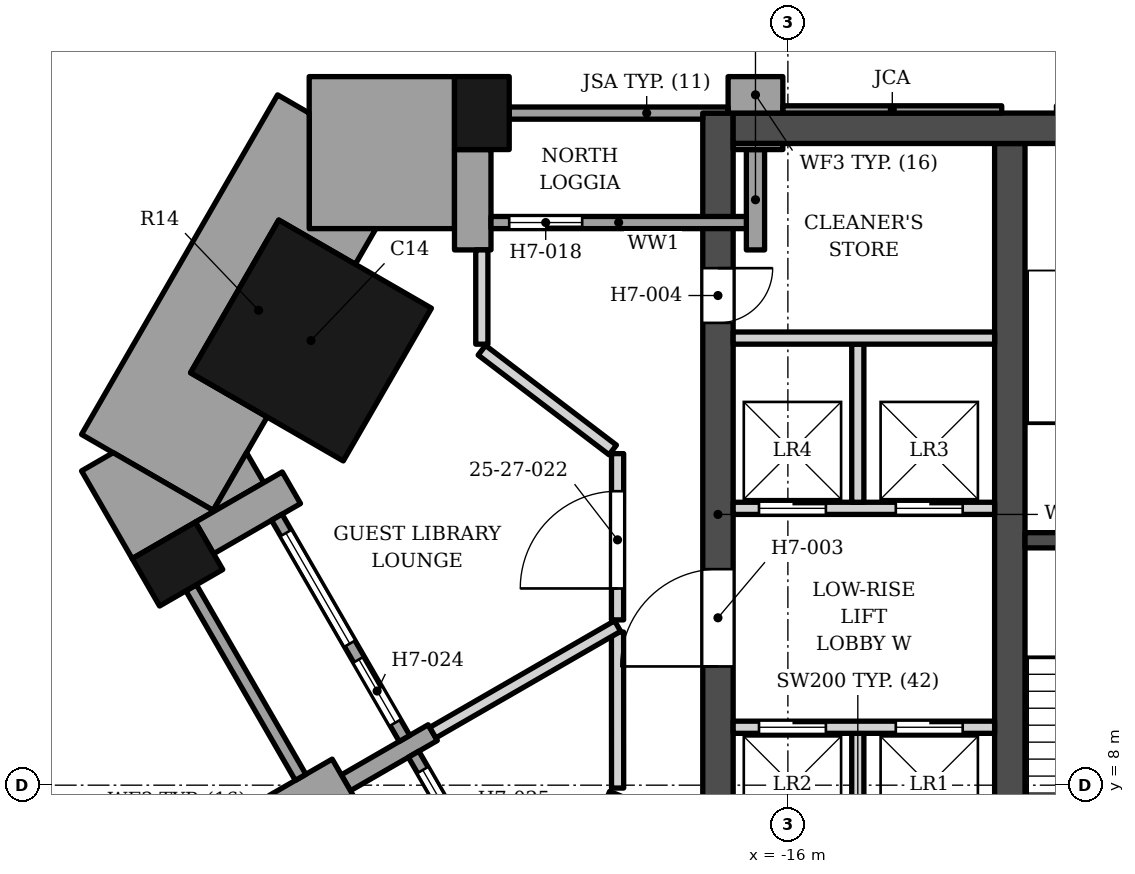
"""IFC4 building model, lengths in metres.
Left out: names, types, materials, properties, quantities, classifications, styles, units other than length and angle.
Written with IfcOpenShell. Run it as: python <this file> out.ifc"""

import sys

from ifc_helpers import new_model, si_unit, direction, frame, frame_2d, origin, origin_2d, place, context, subcontext, project, spatial, polyline, rectangle, outline, extrude, element, fill, save


model = new_model("IFC4")
c1 = context("Model", 3, precision=1e-05, world=origin(), true_north=direction((0.0, 1.0)))
c2 = subcontext(c1, "Body", "Model", "MODEL_VIEW")
j1 = project(units=[si_unit("LENGTHUNIT", "METRE"), si_unit("PLANEANGLEUNIT", "RADIAN")], contexts=[c1])
p1 = place(None, origin())
s1 = spatial("IfcSite", under=j1, at=p1, CompositionType="ELEMENT")
p2 = place(p1, origin())
s2 = spatial("IfcBuilding", under=s1, at=p2, CompositionType="ELEMENT")
p3 = place(p2, frame((0.0, 0.0, 112.2)))
s3 = spatial("IfcBuildingStorey", under=s2, at=p3, CompositionType="ELEMENT", Elevation=112.2)
p4 = place(p3, frame((-16.9, 18.802, 0.0), z_axis=(0.0, 0.0, 1.0), x_axis=(1.0, 0.0, 0.0)))
e1 = element("IfcWall", 1, at=p4, inside=s3, PredefinedType="SHEAR", context=c2, shape_type="SweptSolid", body=[
    extrude(rectangle(XDim=33.8, YDim=0.5, at=frame_2d((16.9, 0.0))), origin(), (0.0, 0.0, 1.0), 3.4),
])
p5 = place(p3, frame((-12.35, 5.253, 0.0), z_axis=(0.0, 0.0, 1.0), x_axis=(0.0, 1.0, 0.0)))
e2 = element("IfcWall", 2, at=p5, inside=s3, PredefinedType="SHEAR", context=c2, shape_type="SweptSolid", body=[
    extrude(rectangle(XDim=13.3, YDim=0.5, at=frame_2d((6.65, 0.0))), origin(), (0.0, 0.0, 1.0), 3.4),
])
p6 = place(p3, frame((-12.1, 12.028, 0.0), z_axis=(0.0, 0.0, 1.0), x_axis=(1.0, 0.0, 0.0)))
e3 = element("IfcWall", 3, at=p6, inside=s3, PredefinedType="SHEAR", context=c2, shape_type="SweptSolid", body=[
    extrude(rectangle(XDim=3.75, YDim=0.25, at=frame_2d((1.875, 0.0))), origin(), (0.0, 0.0, 1.0), 3.4),
])
p7 = place(p3, frame((-17.15, 5.853, 0.0), z_axis=(0.0, 0.0, 1.0), x_axis=(0.0, 1.0, 0.0)))
e4 = element("IfcWall", 4, at=p7, inside=s3, PredefinedType="SHEAR", context=c2, shape_type="SweptSolid", body=[
    extrude(rectangle(XDim=13.2, YDim=0.5, at=frame_2d((6.6, 0.0))), origin(), (0.0, 0.0, 1.0), 3.4),
])
p8 = place(p7, frame((4.1, 0.0, 0.0)))
e5 = element("IfcOpeningElement", 5, at=p8, cuts=e4, PredefinedType="OPENING", context=c2, shape_type="SweptSolid", body=[
    extrude(rectangle(XDim=1.6, YDim=2.1, at=frame_2d((0.8, 1.05))), frame((0.0, 0.26, 0.0), z_axis=(0.0, -1.0, 0.0), x_axis=(1.0, 0.0, 0.0)), (0.0, 0.0, 1.0), 0.52),
])
p9 = place(p7, frame((9.75, 0.0, 0.0)))
e6 = element("IfcOpeningElement", 6, at=p9, cuts=e4, PredefinedType="OPENING", context=c2, shape_type="SweptSolid", body=[
    extrude(rectangle(XDim=0.9, YDim=2.1, at=frame_2d((0.45, 1.05))), frame((0.0, 0.26, 0.0), z_axis=(0.0, -1.0, 0.0), x_axis=(1.0, 0.0, 0.0)), (0.0, 0.0, 1.0), 0.52),
])
p10 = place(p3, frame((-23.843, 15.313, 0.0), z_axis=(0.0, 0.0, 1.0), x_axis=(0.866025377604, -0.500000045345, 0.0)))
e7 = element("IfcColumn", 7, at=p10, inside=s3, PredefinedType="COLUMN", context=c2, shape_type="SweptSolid", body=[
    extrude(rectangle(XDim=2.9, YDim=2.9, at=origin_2d()), origin(), (0.0, 0.0, 1.0), 3.4),
])
for number, where, z_axis, x_axis in (
    (8, (-26.039, 11.636, 0.0), (0.0, 0.0, 1.0), (0.5, -0.866, 0.0)),
    (9, (-21.033, 19.053, 0.0), (0.0, 0.0, 1.0), (-1.0, 0.0, 0.0)),
):
    element("IfcColumn", number, at=place(p3, frame(where, z_axis=z_axis, x_axis=x_axis)), inside=s3, PredefinedType="COLUMN", context=c2, shape_type="SweptSolid", body=[
        extrude(rectangle(XDim=0.9, YDim=1.2, at=origin_2d()), origin(), (0.0, 0.0, 1.0), 3.4),
    ])
p11 = place(p3, frame((-25.594, 12.066, 0.0), z_axis=(0.0, 0.0, 1.0), x_axis=(0.866040211805, 0.499974350878, 0.0)))
e10 = element("IfcWall", 10, at=p11, inside=s3, PredefinedType="SOLIDWALL", context=c2, shape_type="SweptSolid", body=[
    extrude(rectangle(XDim=1.65, YDim=0.6, at=frame_2d((0.825, 0.0))), origin(), (0.0, 0.0, 1.0), 2.63),
])
p12 = place(p3, frame((-24.309, 7.439, 0.0), z_axis=(0.0, 0.0, 1.0), x_axis=(0.865955154139, 0.50012165622, 0.0)))
e11 = element("IfcWall", 11, at=p12, inside=s3, PredefinedType="SOLIDWALL", context=c2, shape_type="SweptSolid", body=[
    extrude(rectangle(XDim=1.2, YDim=0.9, at=frame_2d((0.6, 0.0))), origin(), (0.0, 0.0, 1.0), 2.63),
])
p13 = place(p3, frame((-23.27, 8.039, 0.0), z_axis=(0.0, 0.0, 1.0), x_axis=(0.866040211805, 0.499974350878, 0.0)))
e12 = element("IfcWall", 12, at=p13, inside=s3, PredefinedType="SOLIDWALL", context=c2, shape_type="SweptSolid", body=[
    extrude(rectangle(XDim=1.65, YDim=0.3, at=frame_2d((0.825, 0.0))), origin(), (0.0, 0.0, 1.0), 2.65),
])
p14 = place(p3, frame((-25.814, 11.246, 0.0), z_axis=(0.0, 0.0, 1.0), x_axis=(0.500012057535, -0.866018442252, 0.0)))
e13 = element("IfcWall", 13, at=p14, inside=s3, PredefinedType="SOLIDWALL", context=c2, shape_type="SweptSolid", body=[
    extrude(rectangle(XDim=3.6, YDim=0.2, at=frame_2d((1.8, 0.0))), origin(), (0.0, 0.0, 1.0), 2.63),
])
p15 = place(p3, frame((-24.405, 12.406, 0.0), z_axis=(0.0, 0.0, 1.0), x_axis=(0.500002543286, -0.866023935413, 0.0)))
e14 = element("IfcWall", 14, at=p15, inside=s3, PredefinedType="ELEMENTEDWALL", context=c2, shape_type="SweptSolid", body=[
    extrude(rectangle(XDim=4.2, YDim=0.2, at=frame_2d((2.1, 0.0))), origin(), (0.0, 0.0, 1.0), 2.65),
])
p16 = place(p15, frame((0.3, 0.0, 0.6)))
e15 = element("IfcOpeningElement", 15, at=p16, cuts=e14, PredefinedType="OPENING", context=c2, shape_type="SweptSolid", body=[
    extrude(rectangle(XDim=2.1, YDim=1.8, at=frame_2d((1.05, 0.9))), frame((0.0, 0.11, 0.0), z_axis=(0.0, -1.0, 0.0), x_axis=(1.0, 0.0, 0.0)), (0.0, 0.0, 1.0), 0.22),
])
p17 = place(p15, frame((2.7, 0.0, 0.0)))
e16 = element("IfcOpeningElement", 16, at=p17, cuts=e14, PredefinedType="OPENING", context=c2, shape_type="SweptSolid", body=[
    extrude(rectangle(XDim=1.2, YDim=2.4, at=frame_2d((0.6, 1.2))), frame((0.0, 0.11, 0.0), z_axis=(0.0, -1.0, 0.0), x_axis=(1.0, 0.0, 0.0)), (0.0, 0.0, 1.0), 0.22),
])
p18 = place(p3, frame((-22.155, 8.509, 0.0), z_axis=(0.0, 0.0, 1.0), x_axis=(0.500027713859, -0.866009402589, 0.0)))
e17 = element("IfcWall", 17, at=p18, inside=s3, PredefinedType="ELEMENTEDWALL", context=c2, shape_type="SweptSolid", body=[
    extrude(rectangle(XDim=4.2, YDim=0.2, at=frame_2d((2.1, 0.0))), origin(), (0.0, 0.0, 1.0), 2.65),
])
p19 = place(p18, frame((0.3, 0.0, 0.6)))
e18 = element("IfcOpeningElement", 18, at=p19, cuts=e17, PredefinedType="OPENING", context=c2, shape_type="SweptSolid", body=[
    extrude(rectangle(XDim=2.1, YDim=1.8, at=frame_2d((1.05, 0.9))), frame((0.0, 0.11, 0.0), z_axis=(0.0, -1.0, 0.0), x_axis=(1.0, 0.0, 0.0)), (0.0, 0.0, 1.0), 0.22),
])
p20 = place(p18, frame((2.7, 0.0, 0.0)))
e19 = element("IfcOpeningElement", 19, at=p20, cuts=e17, PredefinedType="OPENING", context=c2, shape_type="SweptSolid", body=[
    extrude(rectangle(XDim=1.2, YDim=2.4, at=frame_2d((0.6, 1.2))), frame((0.0, 0.11, 0.0), z_axis=(0.0, -1.0, 0.0), x_axis=(1.0, 0.0, 0.0)), (0.0, 0.0, 1.0), 0.22),
])
p21 = place(p3, origin())
e20 = element("IfcWall", 20, at=p21, inside=s3, PredefinedType="SOLIDWALL", context=c2, shape_type="SweptSolid", body=[
    extrude(outline(polyline([(-16.083, 19.052), (-16.083, 19.653), (-16.983, 19.653), (-16.983, 19.052), (-16.083, 19.052)])), origin(), (0.0, 0.0, 1.0), 2.65),
])
p22 = place(p3, origin())
e21 = element("IfcWall", 21, at=p22, inside=s3, PredefinedType="SOLIDWALL", context=c2, shape_type="SweptSolid", body=[
    extrude(outline(polyline([(-16.083, 18.453), (-16.083, 18.552), (-16.9, 18.552), (-16.9, 18.453), (-16.083, 18.453)])), origin(), (0.0, 0.0, 1.0), 2.65),
])
p23 = place(p3, origin())
e22 = element("IfcWall", 22, at=p23, inside=s3, PredefinedType="SOLIDWALL", context=c2, shape_type="SweptSolid", body=[
    extrude(outline(polyline([(-16.383, 16.802), (-16.383, 18.453), (-16.683, 18.453), (-16.683, 16.802), (-16.383, 16.802)])), origin(), (0.0, 0.0, 1.0), 2.65),
])
p24 = place(p3, origin())
e23 = element("IfcWall", 23, at=p24, inside=s3, PredefinedType="SOLIDWALL", context=c2, shape_type="SweptSolid", body=[
    extrude(outline(polyline([(-21.483, 18.453), (-21.483, 16.802), (-20.883, 16.802), (-20.883, 18.453), (-21.483, 18.453)])), origin(), (0.0, 0.0, 1.0), 2.63),
])
p25 = place(p3, origin())
e24 = element("IfcWall", 24, at=p25, inside=s3, PredefinedType="SOLIDWALL", context=c2, shape_type="SweptSolid", body=[
    extrude(outline(polyline([(-16.083, 19.173), (-16.083, 19.052), (-12.483, 19.052), (-12.483, 19.173), (-16.083, 19.173)])), origin(), (0.0, 0.0, 1.0), 2.65),
])
p26 = place(p3, origin())
e25 = element("IfcWall", 25, at=p26, inside=s3, PredefinedType="SOLIDWALL", context=c2, shape_type="SweptSolid", body=[
    extrude(outline(polyline([(-20.583, 19.153), (-20.583, 18.953), (-17.4, 18.953), (-17.4, 19.052), (-16.983, 19.052), (-16.983, 19.153), (-20.583, 19.153)])), origin(), (0.0, 0.0, 1.0), 2.65),
])
p27 = place(p3, frame((-16.683, 17.252, 0.0), z_axis=(0.0, 0.0, 1.0), x_axis=(-1.0, 0.0, 0.0)))
e26 = element("IfcWall", 26, at=p27, inside=s3, PredefinedType="ELEMENTEDWALL", context=c2, shape_type="SweptSolid", body=[
    extrude(rectangle(XDim=4.2, YDim=0.2, at=frame_2d((2.1, 0.0))), origin(), (0.0, 0.0, 1.0), 2.65),
])
p28 = place(p27, frame((2.7, 0.0, 0.0)))
e27 = element("IfcOpeningElement", 27, at=p28, cuts=e26, PredefinedType="OPENING", context=c2, shape_type="SweptSolid", body=[
    extrude(rectangle(XDim=1.2, YDim=2.4, at=frame_2d((0.6, 1.2))), frame((0.0, 0.11, 0.0), z_axis=(0.0, -1.0, 0.0), x_axis=(1.0, 0.0, 0.0)), (0.0, 0.0, 1.0), 0.22),
])
p29 = place(p3, origin())
e28 = element("IfcWall", 28, at=p29, inside=s3, PredefinedType="SOLIDWALL", context=c2, shape_type="SweptSolid", body=[
    extrude(outline(polyline([(-23.873, 17.153), (-21.483, 17.153), (-21.483, 18.453), (-21.483, 18.453), (-21.483, 19.653), (-23.873, 19.653), (-23.873, 17.153)])), origin(), (0.0, 0.0, 1.0), 2.63),
])
p30 = place(p3, origin())
e29 = element("IfcWall", 29, at=p30, inside=s3, PredefinedType="SOLIDWALL", context=c2, shape_type="SweptSolid", body=[
    extrude(outline(polyline([(-23.114, 16.566), (-22.776, 17.153), (-23.873, 17.153), (-23.873, 19.052), (-24.392, 19.353), (-27.616, 13.768), (-25.451, 12.518), (-24.564, 14.055), (-25.824, 14.782), (-24.374, 17.294), (-23.114, 16.566)])), origin(), (0.0, 0.0, 1.0), 2.63),
])
p31 = place(p3, origin())
e30 = element("IfcWall", 30, at=p31, inside=s3, PredefinedType="SOLIDWALL", context=c2, shape_type="SweptSolid", body=[
    extrude(outline(polyline([(-26.784, 11.726), (-24.619, 12.976), (-24.903, 13.468), (-25.451, 12.518), (-27.097, 13.468), (-27.616, 13.168), (-26.784, 11.726)])), origin(), (0.0, 0.0, 1.0), 2.63),
])
p32 = place(p3, frame((-14.85, 6.353, 0.0), z_axis=(0.0, 0.0, 1.0), x_axis=(0.0, 1.0, 0.0)))
e31 = element("IfcWall", 31, at=p32, inside=s3, PredefinedType="SOLIDWALL", context=c2, shape_type="SweptSolid", body=[
    extrude(rectangle(XDim=2.5, YDim=0.2, at=frame_2d((1.25, 0.0))), origin(), (0.0, 0.0, 1.0), 3.23),
])
p33 = place(p3, frame((-16.9, 8.953, 0.0), z_axis=(0.0, 0.0, 1.0), x_axis=(1.0, 0.0, 0.0)))
e32 = element("IfcWall", 32, at=p33, inside=s3, PredefinedType="SOLIDWALL", context=c2, shape_type="SweptSolid", body=[
    extrude(rectangle(XDim=4.3, YDim=0.2, at=frame_2d((2.15, 0.0))), origin(), (0.0, 0.0, 1.0), 3.23),
])
p34 = place(p33, frame((2.675, 0.0, 0.0)))
e33 = element("IfcOpeningElement", 33, at=p34, cuts=e32, PredefinedType="OPENING", context=c2, shape_type="SweptSolid", body=[
    extrude(rectangle(XDim=1.1, YDim=2.1, at=frame_2d((0.55, 1.05))), frame((0.0, 0.11, 0.0), z_axis=(0.0, -1.0, 0.0), x_axis=(1.0, 0.0, 0.0)), (0.0, 0.0, 1.0), 0.22),
])
p35 = place(p33, frame((0.425, 0.0, 0.0)))
e34 = element("IfcOpeningElement", 34, at=p35, cuts=e32, PredefinedType="OPENING", context=c2, shape_type="SweptSolid", body=[
    extrude(rectangle(XDim=1.1, YDim=2.1, at=frame_2d((0.55, 1.05))), frame((0.0, 0.11, 0.0), z_axis=(0.0, -1.0, 0.0), x_axis=(1.0, 0.0, 0.0)), (0.0, 0.0, 1.0), 0.22),
])
p36 = place(p3, frame((-16.9, 12.552, 0.0), z_axis=(0.0, 0.0, 1.0), x_axis=(1.0, 0.0, 0.0)))
e35 = element("IfcWall", 35, at=p36, inside=s3, PredefinedType="SOLIDWALL", context=c2, shape_type="SweptSolid", body=[
    extrude(rectangle(XDim=4.3, YDim=0.2, at=frame_2d((2.15, 0.0))), origin(), (0.0, 0.0, 1.0), 3.23),
])
p37 = place(p36, frame((2.675, 0.0, 0.0)))
e36 = element("IfcOpeningElement", 36, at=p37, cuts=e35, PredefinedType="OPENING", context=c2, shape_type="SweptSolid", body=[
    extrude(rectangle(XDim=1.1, YDim=2.1, at=frame_2d((0.55, 1.05))), frame((0.0, 0.11, 0.0), z_axis=(0.0, -1.0, 0.0), x_axis=(1.0, 0.0, 0.0)), (0.0, 0.0, 1.0), 0.22),
])
p38 = place(p36, frame((0.425, 0.0, 0.0)))
e37 = element("IfcOpeningElement", 37, at=p38, cuts=e35, PredefinedType="OPENING", context=c2, shape_type="SweptSolid", body=[
    extrude(rectangle(XDim=1.1, YDim=2.1, at=frame_2d((0.55, 1.05))), frame((0.0, 0.11, 0.0), z_axis=(0.0, -1.0, 0.0), x_axis=(1.0, 0.0, 0.0)), (0.0, 0.0, 1.0), 0.22),
])
p39 = place(p3, frame((-14.85, 12.653, 0.0), z_axis=(0.0, 0.0, 1.0), x_axis=(0.0, 1.0, 0.0)))
e38 = element("IfcWall", 38, at=p39, inside=s3, PredefinedType="SOLIDWALL", context=c2, shape_type="SweptSolid", body=[
    extrude(rectangle(XDim=2.6, YDim=0.2, at=frame_2d((1.3, 0.0))), origin(), (0.0, 0.0, 1.0), 3.23),
])
p40 = place(p3, frame((-16.9, 15.353, 0.0), z_axis=(0.0, 0.0, 1.0), x_axis=(1.0, 0.0, 0.0)))
e39 = element("IfcWall", 39, at=p40, inside=s3, PredefinedType="SOLIDWALL", context=c2, shape_type="SweptSolid", body=[
    extrude(rectangle(XDim=4.3, YDim=0.2, at=frame_2d((2.15, 0.0))), origin(), (0.0, 0.0, 1.0), 3.23),
])
p41 = place(p3, frame((-19.4, 6.496, 0.0), z_axis=(0.0, 0.0, 1.0), x_axis=(0.380699876076, 0.924698655971, 0.0)))
e40 = element("IfcWall", 40, at=p41, inside=s3, PredefinedType="PARTITIONING", context=c2, shape_type="SweptSolid", body=[
    extrude(rectangle(XDim=1.476, YDim=0.2, at=frame_2d((0.738, 0.0))), origin(), (0.0, 0.0, 1.0), 3.23),
])
p42 = place(p3, frame((-18.802, 10.518, 0.0), z_axis=(0.0, 0.0, 1.0), x_axis=(0.000570993436, -0.999999836983, 0.0)))
e41 = element("IfcWall", 41, at=p42, inside=s3, PredefinedType="PARTITIONING", context=c2, shape_type="SweptSolid", body=[
    extrude(rectangle(XDim=2.565, YDim=0.2, at=frame_2d((1.283, 0.0))), origin(), (0.0, 0.0, 1.0), 3.23),
])
p43 = place(p3, frame((-21.84, 8.864, 0.0), z_axis=(0.0, 0.0, 1.0), x_axis=(0.866284025074, 0.499551787007, 0.0)))
e42 = element("IfcWall", 42, at=p43, inside=s3, PredefinedType="PARTITIONING", context=c2, shape_type="SweptSolid", body=[
    extrude(rectangle(XDim=3.509, YDim=0.2, at=frame_2d((1.754, 0.0))), origin(), (0.0, 0.0, 1.0), 3.23),
])
p44 = place(p3, frame((-18.802, 10.718, 0.0), z_axis=(0.0, 0.0, 1.0), x_axis=(0.000535762045, 0.99999985648, 0.0)))
e43 = element("IfcWall", 43, at=p44, inside=s3, PredefinedType="PARTITIONING", context=c2, shape_type="SweptSolid", body=[
    extrude(rectangle(XDim=2.734, YDim=0.2, at=frame_2d((1.367, 0.0))), origin(), (0.0, 0.0, 1.0), 3.23),
])
p45 = place(p44, frame((0.516, 0.0, 0.0)))
e44 = element("IfcOpeningElement", 44, at=p45, cuts=e43, PredefinedType="OPENING", context=c2, shape_type="SweptSolid", body=[
    extrude(rectangle(XDim=1.6, YDim=2.1, at=frame_2d((0.8, 1.05))), frame((0.0, 0.11, 0.0), z_axis=(0.0, -1.0, 0.0), x_axis=(1.0, 0.0, 0.0)), (0.0, 0.0, 1.0), 0.22),
])
p46 = place(p3, frame((-21.033, 15.152, 0.0), z_axis=(0.0, 0.0, 1.0), x_axis=(0.79564910386, -0.605757792791, 0.0)))
e45 = element("IfcWall", 45, at=p46, inside=s3, PredefinedType="PARTITIONING", context=c2, shape_type="SweptSolid", body=[
    extrude(rectangle(XDim=2.706, YDim=0.2, at=frame_2d((1.353, 0.0))), origin(), (0.0, 0.0, 1.0), 3.23),
])
p47 = place(p3, frame((-21.033, 16.802, 0.0), z_axis=(0.0, 0.0, 1.0), x_axis=(0.0, -1.0, 0.0)))
e46 = element("IfcWall", 46, at=p47, inside=s3, PredefinedType="PARTITIONING", context=c2, shape_type="SweptSolid", body=[
    extrude(rectangle(XDim=1.55, YDim=0.2, at=frame_2d((0.775, 0.0))), origin(), (0.0, 0.0, 1.0), 3.23),
])
p48 = place(p16, origin())
e47 = element("IfcWindow", 47, at=p48, inside=s3, PartitioningType="SINGLE_PANEL", PredefinedType="WINDOW", context=c2, shape_type="SweptSolid", body=[
    extrude(rectangle(XDim=2.1, YDim=1.8, at=frame_2d((1.05, 0.9))), frame((0.0, 0.03, 0.0), z_axis=(0.0, -1.0, 0.0), x_axis=(1.0, 0.0, 0.0)), (0.0, 0.0, 1.0), 0.06),
])
fill(e15, e47)
p49 = place(p17, origin())
e48 = element("IfcDoor", 48, at=p49, inside=s3, OperationType="SINGLE_SWING_LEFT", PredefinedType="DOOR", context=c2, shape_type="SweptSolid", body=[
    extrude(rectangle(XDim=1.2, YDim=2.4, at=frame_2d((0.6, 1.2))), frame((0.0, 0.025, 0.0), z_axis=(0.0, -1.0, 0.0), x_axis=(1.0, 0.0, 0.0)), (0.0, 0.0, 1.0), 0.05),
])
fill(e16, e48)
p50 = place(p19, origin())
e49 = element("IfcWindow", 49, at=p50, inside=s3, PartitioningType="SINGLE_PANEL", PredefinedType="WINDOW", context=c2, shape_type="SweptSolid", body=[
    extrude(rectangle(XDim=2.1, YDim=1.8, at=frame_2d((1.05, 0.9))), frame((0.0, 0.03, 0.0), z_axis=(0.0, -1.0, 0.0), x_axis=(1.0, 0.0, 0.0)), (0.0, 0.0, 1.0), 0.06),
])
fill(e18, e49)
p51 = place(p28, origin())
e50 = element("IfcDoor", 50, at=p51, inside=s3, OperationType="SINGLE_SWING_LEFT", PredefinedType="DOOR", context=c2, shape_type="SweptSolid", body=[
    extrude(rectangle(XDim=1.2, YDim=2.4, at=frame_2d((0.6, 1.2))), frame((0.0, 0.025, 0.0), z_axis=(0.0, -1.0, 0.0), x_axis=(1.0, 0.0, 0.0)), (0.0, 0.0, 1.0), 0.05),
])
fill(e27, e50)
p52 = place(p34, origin())
e51 = element("IfcDoor", 51, at=p52, inside=s3, OperationType="DOUBLE_DOOR_SLIDING", PredefinedType="DOOR", context=c2, shape_type="SweptSolid", body=[
    extrude(rectangle(XDim=1.1, YDim=2.1, at=frame_2d((0.55, 1.05))), frame((0.0, 0.025, 0.0), z_axis=(0.0, -1.0, 0.0), x_axis=(1.0, 0.0, 0.0)), (0.0, 0.0, 1.0), 0.05),
])
fill(e33, e51)
p53 = place(p37, origin())
e52 = element("IfcDoor", 52, at=p53, inside=s3, OperationType="DOUBLE_DOOR_SLIDING", PredefinedType="DOOR", context=c2, shape_type="SweptSolid", body=[
    extrude(rectangle(XDim=1.1, YDim=2.1, at=frame_2d((0.55, 1.05))), frame((0.0, 0.025, 0.0), z_axis=(0.0, -1.0, 0.0), x_axis=(1.0, 0.0, 0.0)), (0.0, 0.0, 1.0), 0.05),
])
fill(e36, e52)
p54 = place(p35, origin())
e53 = element("IfcDoor", 53, at=p54, inside=s3, OperationType="DOUBLE_DOOR_SLIDING", PredefinedType="DOOR", context=c2, shape_type="SweptSolid", body=[
    extrude(rectangle(XDim=1.1, YDim=2.1, at=frame_2d((0.55, 1.05))), frame((0.0, 0.025, 0.0), z_axis=(0.0, -1.0, 0.0), x_axis=(1.0, 0.0, 0.0)), (0.0, 0.0, 1.0), 0.05),
])
fill(e34, e53)
p55 = place(p38, origin())
e54 = element("IfcDoor", 54, at=p55, inside=s3, OperationType="DOUBLE_DOOR_SLIDING", PredefinedType="DOOR", context=c2, shape_type="SweptSolid", body=[
    extrude(rectangle(XDim=1.1, YDim=2.1, at=frame_2d((0.55, 1.05))), frame((0.0, 0.025, 0.0), z_axis=(0.0, -1.0, 0.0), x_axis=(1.0, 0.0, 0.0)), (0.0, 0.0, 1.0), 0.05),
])
fill(e37, e54)
p56 = place(p8, origin())
e55 = element("IfcDoor", 55, at=p56, inside=s3, OperationType="DOUBLE_DOOR_SINGLE_SWING", PredefinedType="DOOR", context=c2, shape_type="SweptSolid", body=[
    extrude(rectangle(XDim=1.6, YDim=2.1, at=frame_2d((0.8, 1.05))), frame((0.0, 0.025, 0.0), z_axis=(0.0, -1.0, 0.0), x_axis=(1.0, 0.0, 0.0)), (0.0, 0.0, 1.0), 0.05),
])
fill(e5, e55)
p57 = place(p9, origin())
e56 = element("IfcDoor", 56, at=p57, inside=s3, OperationType="SINGLE_SWING_RIGHT", PredefinedType="DOOR", context=c2, shape_type="SweptSolid", body=[
    extrude(rectangle(XDim=0.9, YDim=2.1, at=frame_2d((0.45, 1.05))), frame((0.0, 0.025, 0.0), z_axis=(0.0, -1.0, 0.0), x_axis=(1.0, 0.0, 0.0)), (0.0, 0.0, 1.0), 0.05),
])
fill(e6, e56)
p58 = place(p45, origin())
e57 = element("IfcDoor", 57, at=p58, inside=s3, OperationType="DOUBLE_DOOR_SINGLE_SWING", PredefinedType="DOOR", context=c2, shape_type="SweptSolid", body=[
    extrude(rectangle(XDim=1.6, YDim=2.1, at=frame_2d((0.8, 1.05))), frame((0.0, 0.025, 0.0), z_axis=(0.0, -1.0, 0.0), x_axis=(1.0, 0.0, 0.0)), (0.0, 0.0, 1.0), 0.05),
])
fill(e44, e57)
save(model, sys.argv[1])
